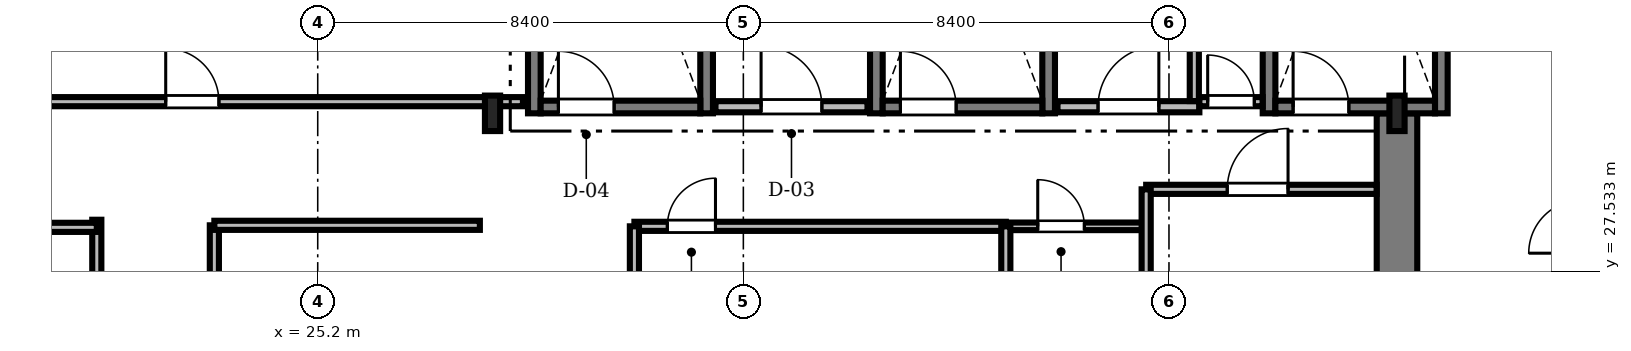
"""IFC4 building model, lengths in metres.
Left out: names, types, materials, properties, quantities, classifications, styles, units other than length and angle.
Written with IfcOpenShell. Run it as: python <this file> out.ifc"""

import sys

from ifc_helpers import new_model, si_unit, direction, frame, frame_2d, origin, origin_2d, place, context, subcontext, project, spatial, rectangle, i_section, extrude, source, transform, mapped, element, fill, save


model = new_model("IFC4")
c1 = context("Model", 3, precision=1e-05, world=origin(), true_north=direction((0.0, 1.0)))
c2 = subcontext(c1, "Body", "Model", "MODEL_VIEW")
j1 = project(units=[si_unit("LENGTHUNIT", "METRE"), si_unit("PLANEANGLEUNIT", "RADIAN")], contexts=[c1])
p1 = place(None, origin())
s1 = spatial("IfcSite", under=j1, at=p1, CompositionType="ELEMENT")
p2 = place(p1, origin())
s2 = spatial("IfcBuilding", under=s1, at=p2, CompositionType="ELEMENT")
p3 = place(p2, frame((0.0, 0.0, 222.3)))
s3 = spatial("IfcBuildingStorey", under=s2, at=p3, CompositionType="ELEMENT", Elevation=222.3)
m1 = source(origin(), c2, "Body", "SweptSolid", [
    extrude(rectangle(XDim=13.15, YDim=0.8, at=frame_2d((6.575, 0.0))), origin(), (0.0, 0.0, 1.0), 3.53),
])
p4 = place(p3, frame((46.5, 17.5, 0.0), z_axis=(0.0, 0.0, 1.0), x_axis=(0.0, 1.0, 0.0)))
e1 = element("IfcWall", 1, at=p4, inside=s3, PredefinedType="SHEAR", context=c2, shape_type="MappedRepresentation", body=[
    mapped(m1, transform((0.0, 0.0, 0.0), scale=1.0)),
])
m2 = source(origin(), c2, "Body", "SweptSolid", [
    extrude(i_section(OverallWidth=0.3, OverallDepth=0.7, WebThickness=0.017, FlangeThickness=0.032, FilletRadius=0.027, at=origin_2d()), origin(), (0.0, 0.0, 1.0), 3.53),
])
for number, where, z_axis, x_axis in (
    (2, (28.65, 30.65, 0.0), (0.0, 0.0, 1.0), (1.0, 0.0, 0.0)),
    (3, (46.5, 30.65, 0.0), (0.0, 0.0, 1.0), (1.0, 0.0, 0.0)),
):
    element("IfcColumn", number, at=place(p3, frame(where, z_axis=z_axis, x_axis=x_axis)), inside=s3, PredefinedType="COLUMN", context=c2, shape_type="MappedRepresentation", body=[
        mapped(m2, transform((0.0, 0.0, 0.0), scale=1.0)),
    ])
m3 = source(origin(), c2, "Body", "SweptSolid", [
    extrude(rectangle(XDim=9.25, YDim=0.25, at=frame_2d((4.625, 0.0))), origin(), (0.0, 0.0, 1.0), 3.55),
])
for number, where, z_axis, x_axis in (
    (4, (29.475, 30.65, 0.0), (0.0, 0.0, 1.0), (0.0, 1.0, 0.0)),
    (5, (32.875, 30.65, 0.0), (0.0, 0.0, 1.0), (0.0, 1.0, 0.0)),
):
    element("IfcWall", number, at=place(p3, frame(where, z_axis=z_axis, x_axis=x_axis)), inside=s3, PredefinedType="SOLIDWALL", context=c2, shape_type="MappedRepresentation", body=[
        mapped(m3, transform((0.0, 0.0, 0.0), scale=1.0)),
    ])
m4 = source(origin(), c2, "Body", "SweptSolid", [
    extrude(rectangle(XDim=3.15, YDim=0.25, at=frame_2d((1.575, 0.0))), origin(), (0.0, 0.0, 1.0), 3.55),
])
p5 = place(p3, frame((29.6, 30.775, 0.0), z_axis=(0.0, 0.0, 1.0), x_axis=(1.0, 0.0, 0.0)))
e6 = element("IfcWall", 6, at=p5, inside=s3, PredefinedType="SOLIDWALL", context=c2, shape_type="MappedRepresentation", body=[
    mapped(m4, transform((0.0, 0.0, 0.0), scale=1.0)),
])
m5 = source(origin(), c2, "Body", "SweptSolid", [
    extrude(rectangle(XDim=1.1, YDim=2.2, at=frame_2d((0.55, 1.1))), frame((0.0, 0.135, 0.0), z_axis=(0.0, -1.0, 0.0), x_axis=(1.0, 0.0, 0.0)), (0.0, 0.0, 1.0), 0.27),
])
p6 = place(p5, frame((0.35, 0.0, 0.0)))
e7 = element("IfcOpeningElement", 7, at=p6, cuts=e6, PredefinedType="OPENING", context=c2, shape_type="MappedRepresentation", body=[
    mapped(m5, transform((0.0, 0.0, 0.0), scale=1.0)),
])
for number, where, z_axis, x_axis in (
    (8, (36.225, 30.65, 0.0), (0.0, 0.0, 1.0), (0.0, 1.0, 0.0)),
    (9, (39.625, 30.65, 0.0), (0.0, 0.0, 1.0), (0.0, 1.0, 0.0)),
):
    element("IfcWall", number, at=place(p3, frame(where, z_axis=z_axis, x_axis=x_axis)), inside=s3, PredefinedType="SOLIDWALL", context=c2, shape_type="MappedRepresentation", body=[
        mapped(m3, transform((0.0, 0.0, 0.0), scale=1.0)),
    ])
p7 = place(p3, frame((36.35, 30.775, 0.0), z_axis=(0.0, 0.0, 1.0), x_axis=(1.0, 0.0, 0.0)))
e10 = element("IfcWall", 10, at=p7, inside=s3, PredefinedType="SOLIDWALL", context=c2, shape_type="MappedRepresentation", body=[
    mapped(m4, transform((0.0, 0.0, 0.0), scale=1.0)),
])
p8 = place(p7, frame((0.35, 0.0, 0.0)))
e11 = element("IfcOpeningElement", 11, at=p8, cuts=e10, PredefinedType="OPENING", context=c2, shape_type="MappedRepresentation", body=[
    mapped(m5, transform((0.0, 0.0, 0.0), scale=1.0)),
])
for number, where, z_axis, x_axis in (
    (12, (43.975, 30.65, 0.0), (0.0, 0.0, 1.0), (0.0, 1.0, 0.0)),
    (13, (47.375, 30.65, 0.0), (0.0, 0.0, 1.0), (0.0, 1.0, 0.0)),
):
    element("IfcWall", number, at=place(p3, frame(where, z_axis=z_axis, x_axis=x_axis)), inside=s3, PredefinedType="SOLIDWALL", context=c2, shape_type="MappedRepresentation", body=[
        mapped(m3, transform((0.0, 0.0, 0.0), scale=1.0)),
    ])
p9 = place(p3, frame((44.1, 30.775, 0.0), z_axis=(0.0, 0.0, 1.0), x_axis=(1.0, 0.0, 0.0)))
e14 = element("IfcWall", 14, at=p9, inside=s3, PredefinedType="SOLIDWALL", context=c2, shape_type="MappedRepresentation", body=[
    mapped(m4, transform((0.0, 0.0, 0.0), scale=1.0)),
])
p10 = place(p9, frame((0.35, 0.0, 0.0)))
e15 = element("IfcOpeningElement", 15, at=p10, cuts=e14, PredefinedType="OPENING", context=c2, shape_type="MappedRepresentation", body=[
    mapped(m5, transform((0.0, 0.0, 0.0), scale=1.0)),
])
m6 = source(origin(), c2, "Body", "SweptSolid", [
    extrude(rectangle(XDim=3.0, YDim=0.22, at=frame_2d((1.5, 0.0))), origin(), (0.0, 0.0, 1.0), 3.53),
])
p11 = place(p3, frame((33.05, 30.78, 0.0), z_axis=(0.0, 0.0, 1.0), x_axis=(1.0, 0.0, 0.0)))
e16 = element("IfcWall", 16, at=p11, inside=s3, PredefinedType="SOLIDWALL", context=c2, shape_type="MappedRepresentation", body=[
    mapped(m6, transform((0.0, 0.0, 0.0), scale=1.0)),
])
m7 = source(origin(), c2, "Body", "SweptSolid", [
    extrude(rectangle(XDim=1.2, YDim=2.2, at=frame_2d((0.6, 1.1))), frame((0.0, 0.12, 0.0), z_axis=(0.0, -1.0, 0.0), x_axis=(1.0, 0.0, 0.0)), (0.0, 0.0, 1.0), 0.24),
])
p12 = place(p11, frame((0.9, 0.0, 0.0)))
e17 = element("IfcOpeningElement", 17, at=p12, cuts=e16, PredefinedType="OPENING", context=c2, shape_type="MappedRepresentation", body=[
    mapped(m7, transform((0.0, 0.0, 0.0), scale=1.0)),
])
m8 = source(origin(), c2, "Body", "SweptSolid", [
    extrude(rectangle(XDim=2.8, YDim=0.22, at=frame_2d((1.4, 0.0))), origin(), (0.0, 0.0, 1.0), 3.53),
])
p13 = place(p3, frame((39.8, 30.78, 0.0), z_axis=(0.0, 0.0, 1.0), x_axis=(1.0, 0.0, 0.0)))
e18 = element("IfcWall", 18, at=p13, inside=s3, PredefinedType="SOLIDWALL", context=c2, shape_type="MappedRepresentation", body=[
    mapped(m8, transform((0.0, 0.0, 0.0), scale=1.0)),
])
p14 = place(p13, frame((0.8, 0.0, 0.0)))
e19 = element("IfcOpeningElement", 19, at=p14, cuts=e18, PredefinedType="OPENING", context=c2, shape_type="MappedRepresentation", body=[
    mapped(m7, transform((0.0, 0.0, 0.0), scale=1.0)),
])
m9 = source(origin(), c2, "Body", "SweptSolid", [
    extrude(rectangle(XDim=17.828, YDim=0.18, at=frame_2d((8.914, 0.0))), origin(), (0.0, 0.0, 1.0), 2.772),
])
p15 = place(p3, frame((11.422, 30.88, 0.0), z_axis=(0.0, 0.0, 1.0), x_axis=(1.0, 0.0, 0.0)))
e20 = element("IfcWall", 20, at=p15, inside=s3, PredefinedType="PARTITIONING", context=c2, shape_type="MappedRepresentation", body=[
    mapped(m9, transform((0.0, 0.0, 0.0), scale=1.0)),
])
m10 = source(origin(), c2, "Body", "SweptSolid", [
    extrude(rectangle(XDim=1.05, YDim=2.2, at=frame_2d((0.525, 1.1))), frame((0.0, 0.1, 0.0), z_axis=(0.0, -1.0, 0.0), x_axis=(1.0, 0.0, 0.0)), (0.0, 0.0, 1.0), 0.2),
])
p16 = place(p15, frame((10.778, 0.0, 0.0)))
e21 = element("IfcOpeningElement", 21, at=p16, cuts=e20, PredefinedType="OPENING", context=c2, shape_type="MappedRepresentation", body=[
    mapped(m10, transform((0.0, 0.0, 0.0), scale=1.0)),
])
m11 = source(origin(), c2, "Body", "SweptSolid", [
    extrude(rectangle(XDim=14.98, YDim=0.18, at=frame_2d((7.49, 0.0))), origin(), (0.0, 0.0, 1.0), 2.972),
])
p17 = place(p3, frame((20.84, 13.57, 0.0), z_axis=(0.0, 0.0, 1.0), x_axis=(0.0, 1.0, 0.0)))
e22 = element("IfcWall", 22, at=p17, inside=s3, PredefinedType="PARTITIONING", context=c2, shape_type="MappedRepresentation", body=[
    mapped(m11, transform((0.0, 0.0, 0.0), scale=1.0)),
])
p18 = place(p17, frame((1.952, 0.0, 0.0)))
e23 = element("IfcOpeningElement", 23, at=p18, cuts=e22, PredefinedType="OPENING", context=c2, shape_type="MappedRepresentation", body=[
    mapped(m10, transform((0.0, 0.0, 0.0), scale=1.0)),
])
m12 = source(origin(), c2, "Body", "SweptSolid", [
    extrude(rectangle(XDim=0.95, YDim=2.15, at=frame_2d((0.475, 1.075))), frame((0.0, 0.1, 0.0), z_axis=(0.0, -1.0, 0.0), x_axis=(1.0, 0.0, 0.0)), (0.0, 0.0, 1.0), 0.2),
])
p19 = place(p17, frame((8.12, 0.0, 0.0)))
e24 = element("IfcOpeningElement", 24, at=p19, cuts=e22, PredefinedType="OPENING", context=c2, shape_type="MappedRepresentation", body=[
    mapped(m12, transform((0.0, 0.0, 0.0), scale=1.0)),
])
p20 = place(p17, frame((11.838, 0.0, 0.0)))
e25 = element("IfcOpeningElement", 25, at=p20, cuts=e22, PredefinedType="OPENING", context=c2, shape_type="MappedRepresentation", body=[
    mapped(m10, transform((0.0, 0.0, 0.0), scale=1.0)),
])
m13 = source(origin(), c2, "Body", "SweptSolid", [
    extrude(rectangle(XDim=11.94, YDim=0.18, at=frame_2d((5.97, 0.0))), origin(), (0.0, 0.0, 1.0), 2.972),
])
p21 = place(p3, frame((23.16, 16.5, 0.0), z_axis=(0.0, 0.0, 1.0), x_axis=(0.0, 1.0, 0.0)))
e26 = element("IfcWall", 26, at=p21, inside=s3, PredefinedType="PARTITIONING", context=c2, shape_type="MappedRepresentation", body=[
    mapped(m13, transform((0.0, 0.0, 0.0), scale=1.0)),
])
p22 = place(p21, frame((4.5, 0.0, 0.0)))
e27 = element("IfcOpeningElement", 27, at=p22, cuts=e26, PredefinedType="OPENING", context=c2, shape_type="MappedRepresentation", body=[
    mapped(m10, transform((0.0, 0.0, 0.0), scale=1.0)),
])
m14 = source(origin(), c2, "Body", "SweptSolid", [
    extrude(rectangle(XDim=7.33, YDim=0.18, at=frame_2d((3.665, 0.0))), origin(), (0.0, 0.0, 1.0), 3.162),
])
p23 = place(p3, frame((31.45, 28.42, 0.0), z_axis=(0.0, 0.0, 1.0), x_axis=(1.0, 0.0, 0.0)))
e28 = element("IfcWall", 28, at=p23, inside=s3, PredefinedType="PARTITIONING", context=c2, shape_type="MappedRepresentation", body=[
    mapped(m14, transform((0.0, 0.0, 0.0), scale=1.0)),
])
p24 = place(p23, frame((0.65, 0.0, 0.0)))
e29 = element("IfcOpeningElement", 29, at=p24, cuts=e28, PredefinedType="OPENING", context=c2, shape_type="MappedRepresentation", body=[
    mapped(m12, transform((0.0, 0.0, 0.0), scale=1.0)),
])
m15 = source(origin(), c2, "Body", "SweptSolid", [
    extrude(rectangle(XDim=4.548, YDim=0.18, at=frame_2d((2.274, 0.0))), origin(), (0.0, 0.0, 1.0), 3.162),
])
p25 = place(p3, frame((41.55, 29.15, 0.0), z_axis=(0.0, 0.0, 1.0), x_axis=(1.0, 0.0, 0.0)))
e30 = element("IfcWall", 30, at=p25, inside=s3, PredefinedType="PARTITIONING", context=c2, shape_type="MappedRepresentation", body=[
    mapped(m15, transform((0.0, 0.0, 0.0), scale=1.0)),
])
m16 = source(origin(), c2, "Body", "SweptSolid", [
    extrude(rectangle(XDim=1.2, YDim=2.2, at=frame_2d((0.6, 1.1))), frame((0.0, 0.1, 0.0), z_axis=(0.0, -1.0, 0.0), x_axis=(1.0, 0.0, 0.0)), (0.0, 0.0, 1.0), 0.2),
])
p26 = place(p25, frame((1.6, 0.0, 0.0)))
e31 = element("IfcOpeningElement", 31, at=p26, cuts=e30, PredefinedType="OPENING", context=c2, shape_type="MappedRepresentation", body=[
    mapped(m16, transform((0.0, 0.0, 0.0), scale=1.0)),
])
m17 = source(origin(), c2, "Body", "SweptSolid", [
    extrude(rectangle(XDim=2.74, YDim=0.15, at=frame_2d((1.37, 0.0))), origin(), (0.0, 0.0, 1.0), 3.53),
])
p27 = place(p3, frame((38.78, 28.42, 0.0), z_axis=(0.0, 0.0, 1.0), x_axis=(1.0, 0.0, 0.0)))
e32 = element("IfcWall", 32, at=p27, inside=s3, PredefinedType="PARTITIONING", context=c2, shape_type="MappedRepresentation", body=[
    mapped(m17, transform((0.0, 0.0, 0.0), scale=1.0)),
])
m18 = source(origin(), c2, "Body", "SweptSolid", [
    extrude(rectangle(XDim=0.92, YDim=2.1, at=frame_2d((0.46, 1.05))), frame((0.0, 0.085, 0.0), z_axis=(0.0, -1.0, 0.0), x_axis=(1.0, 0.0, 0.0)), (0.0, 0.0, 1.0), 0.17),
])
p28 = place(p27, frame((0.63, 0.0, 0.0)))
e33 = element("IfcOpeningElement", 33, at=p28, cuts=e32, PredefinedType="OPENING", context=c2, shape_type="MappedRepresentation", body=[
    mapped(m18, transform((0.0, 0.0, 0.0), scale=1.0)),
])
m19 = source(origin(), c2, "Body", "SweptSolid", [
    extrude(rectangle(XDim=1.248, YDim=0.18, at=frame_2d((0.624, 0.0))), origin(), (0.0, 0.0, 1.0), 3.53),
])
p29 = place(p3, frame((42.6, 30.88, 0.0), z_axis=(0.0, 0.0, 1.0), x_axis=(1.0, 0.0, 0.0)))
e34 = element("IfcWall", 34, at=p29, inside=s3, PredefinedType="PARTITIONING", context=c2, shape_type="MappedRepresentation", body=[
    mapped(m19, transform((0.0, 0.0, 0.0), scale=1.0)),
])
m20 = source(origin(), c2, "Body", "SweptSolid", [
    extrude(rectangle(XDim=0.92, YDim=2.1, at=frame_2d((0.46, 1.05))), frame((0.0, 0.1, 0.0), z_axis=(0.0, -1.0, 0.0), x_axis=(1.0, 0.0, 0.0)), (0.0, 0.0, 1.0), 0.2),
])
p30 = place(p29, frame((0.164, 0.0, 0.0)))
e35 = element("IfcOpeningElement", 35, at=p30, cuts=e34, PredefinedType="OPENING", context=c2, shape_type="MappedRepresentation", body=[
    mapped(m20, transform((0.0, 0.0, 0.0), scale=1.0)),
])
m21 = source(origin(), c2, "Body", "SweptSolid", [
    extrude(rectangle(XDim=9.61, YDim=0.18, at=frame_2d((4.805, 0.0))), origin(), (0.0, 0.0, 1.0), 2.772),
])
p31 = place(p3, frame((11.23, 28.4, 0.0), z_axis=(0.0, 0.0, 1.0), x_axis=(1.0, 0.0, 0.0)))
e36 = element("IfcWall", 36, at=p31, inside=s3, PredefinedType="PARTITIONING", context=c2, shape_type="MappedRepresentation", body=[
    mapped(m21, transform((0.0, 0.0, 0.0), scale=1.0)),
])
m22 = source(origin(), c2, "Body", "SweptSolid", [
    extrude(rectangle(XDim=5.24, YDim=0.18, at=frame_2d((2.62, 0.0))), origin(), (0.0, 0.0, 1.0), 3.53),
])
p32 = place(p3, frame((23.16, 28.44, 0.0), z_axis=(0.0, 0.0, 1.0), x_axis=(1.0, 0.0, 0.0)))
e37 = element("IfcWall", 37, at=p32, inside=s3, PredefinedType="PARTITIONING", context=c2, shape_type="MappedRepresentation", body=[
    mapped(m22, transform((0.0, 0.0, 0.0), scale=1.0)),
])
m23 = source(origin(), c2, "Body", "SweptSolid", [
    extrude(rectangle(XDim=2.758, YDim=0.18, at=frame_2d((1.379, 0.0))), origin(), (0.0, 0.0, 1.0), 3.53),
])
p33 = place(p3, frame((42.5, 30.892, 0.0), z_axis=(0.0, 0.0, 1.0), x_axis=(0.0, 1.0, 0.0)))
e38 = element("IfcWall", 38, at=p33, inside=s3, PredefinedType="PARTITIONING", context=c2, shape_type="MappedRepresentation", body=[
    mapped(m23, transform((0.0, 0.0, 0.0), scale=1.0)),
])
m24 = source(origin(), c2, "Body", "SweptSolid", [
    extrude(rectangle(XDim=2.35, YDim=0.18, at=frame_2d((1.175, 0.0))), origin(), (0.0, 0.0, 1.0), 2.972),
])
p34 = place(p3, frame((41.55, 26.8, 0.0), z_axis=(0.0, 0.0, 1.0), x_axis=(0.0, 1.0, 0.0)))
e39 = element("IfcWall", 39, at=p34, inside=s3, PredefinedType="PARTITIONING", context=c2, shape_type="MappedRepresentation", body=[
    mapped(m24, transform((0.0, 0.0, 0.0), scale=1.0)),
])
m25 = source(origin(), c2, "Body", "SweptSolid", [
    extrude(rectangle(XDim=1.6, YDim=0.18, at=frame_2d((0.8, 0.0))), origin(), (0.0, 0.0, 1.0), 3.072),
])
for number, where, z_axis, x_axis in (
    (40, (31.45, 26.82, 0.0), (0.0, 0.0, 1.0), (0.0, 1.0, 0.0)),
    (41, (38.78, 26.82, 0.0), (0.0, 0.0, 1.0), (0.0, 1.0, 0.0)),
):
    element("IfcWall", number, at=place(p3, frame(where, z_axis=z_axis, x_axis=x_axis)), inside=s3, PredefinedType="PARTITIONING", context=c2, shape_type="MappedRepresentation", body=[
        mapped(m25, transform((0.0, 0.0, 0.0), scale=1.0)),
    ])
m26 = source(origin(), c2, "Body", "SweptSolid", [
    extrude(rectangle(XDim=1.1, YDim=2.2, at=frame_2d((0.55, 1.1))), frame((0.0, 0.025, 0.0), z_axis=(0.0, -1.0, 0.0), x_axis=(1.0, 0.0, 0.0)), (0.0, 0.0, 1.0), 0.05),
])
p35 = place(p6, origin())
e42 = element("IfcDoor", 42, at=p35, inside=s3, OperationType="SINGLE_SWING_LEFT", PredefinedType="DOOR", context=c2, shape_type="MappedRepresentation", body=[
    mapped(m26, transform((0.0, 0.0, 0.0), scale=1.0)),
])
fill(e7, e42)
p36 = place(p8, origin())
e43 = element("IfcDoor", 43, at=p36, inside=s3, OperationType="SINGLE_SWING_LEFT", PredefinedType="DOOR", context=c2, shape_type="MappedRepresentation", body=[
    mapped(m26, transform((0.0, 0.0, 0.0), scale=1.0)),
])
fill(e11, e43)
p37 = place(p10, origin())
e44 = element("IfcDoor", 44, at=p37, inside=s3, OperationType="SINGLE_SWING_LEFT", PredefinedType="DOOR", context=c2, shape_type="MappedRepresentation", body=[
    mapped(m26, transform((0.0, 0.0, 0.0), scale=1.0)),
])
fill(e15, e44)
m27 = source(origin(), c2, "Body", "SweptSolid", [
    extrude(rectangle(XDim=1.2, YDim=2.2, at=frame_2d((0.6, 1.1))), frame((0.0, 0.025, 0.0), z_axis=(0.0, -1.0, 0.0), x_axis=(1.0, 0.0, 0.0)), (0.0, 0.0, 1.0), 0.05),
])
p38 = place(p12, origin())
e45 = element("IfcDoor", 45, at=p38, inside=s3, OperationType="SINGLE_SWING_LEFT", PredefinedType="DOOR", context=c2, shape_type="MappedRepresentation", body=[
    mapped(m27, transform((0.0, 0.0, 0.0), scale=1.0)),
])
fill(e17, e45)
p39 = place(p14, origin())
e46 = element("IfcDoor", 46, at=p39, inside=s3, OperationType="SINGLE_SWING_RIGHT", PredefinedType="DOOR", context=c2, shape_type="MappedRepresentation", body=[
    mapped(m27, transform((0.0, 0.0, 0.0), scale=1.0)),
])
fill(e19, e46)
m28 = source(origin(), c2, "Body", "SweptSolid", [
    extrude(rectangle(XDim=1.05, YDim=2.2, at=frame_2d((0.525, 1.1))), frame((0.0, 0.025, 0.0), z_axis=(0.0, -1.0, 0.0), x_axis=(1.0, 0.0, 0.0)), (0.0, 0.0, 1.0), 0.05),
])
p40 = place(p16, origin())
e47 = element("IfcDoor", 47, at=p40, inside=s3, OperationType="SINGLE_SWING_LEFT", PredefinedType="DOOR", context=c2, shape_type="MappedRepresentation", body=[
    mapped(m28, transform((0.0, 0.0, 0.0), scale=1.0)),
])
fill(e21, e47)
m29 = source(origin(), c2, "Body", "SweptSolid", [
    extrude(rectangle(XDim=0.95, YDim=2.15, at=frame_2d((0.475, 1.075))), frame((0.0, 0.025, 0.0), z_axis=(0.0, -1.0, 0.0), x_axis=(1.0, 0.0, 0.0)), (0.0, 0.0, 1.0), 0.05),
])
p41 = place(p24, origin())
e48 = element("IfcDoor", 48, at=p41, inside=s3, OperationType="SINGLE_SWING_RIGHT", PredefinedType="DOOR", context=c2, shape_type="MappedRepresentation", body=[
    mapped(m29, transform((0.0, 0.0, 0.0), scale=1.0)),
])
fill(e29, e48)
p42 = place(p26, origin())
e49 = element("IfcDoor", 49, at=p42, inside=s3, OperationType="SINGLE_SWING_RIGHT", PredefinedType="DOOR", context=c2, shape_type="MappedRepresentation", body=[
    mapped(m27, transform((0.0, 0.0, 0.0), scale=1.0)),
])
fill(e31, e49)
m30 = source(origin(), c2, "Body", "SweptSolid", [
    extrude(rectangle(XDim=0.92, YDim=2.1, at=frame_2d((0.46, 1.05))), frame((0.0, 0.025, 0.0), z_axis=(0.0, -1.0, 0.0), x_axis=(1.0, 0.0, 0.0)), (0.0, 0.0, 1.0), 0.05),
])
p43 = place(p28, origin())
e50 = element("IfcDoor", 50, at=p43, inside=s3, OperationType="SINGLE_SWING_LEFT", PredefinedType="DOOR", context=c2, shape_type="MappedRepresentation", body=[
    mapped(m30, transform((0.0, 0.0, 0.0), scale=1.0)),
])
fill(e33, e50)
p44 = place(p30, origin())
e51 = element("IfcDoor", 51, at=p44, inside=s3, OperationType="SINGLE_SWING_LEFT", PredefinedType="DOOR", context=c2, shape_type="MappedRepresentation", body=[
    mapped(m30, transform((0.0, 0.0, 0.0), scale=1.0)),
])
fill(e35, e51)
save(model, sys.argv[1])
